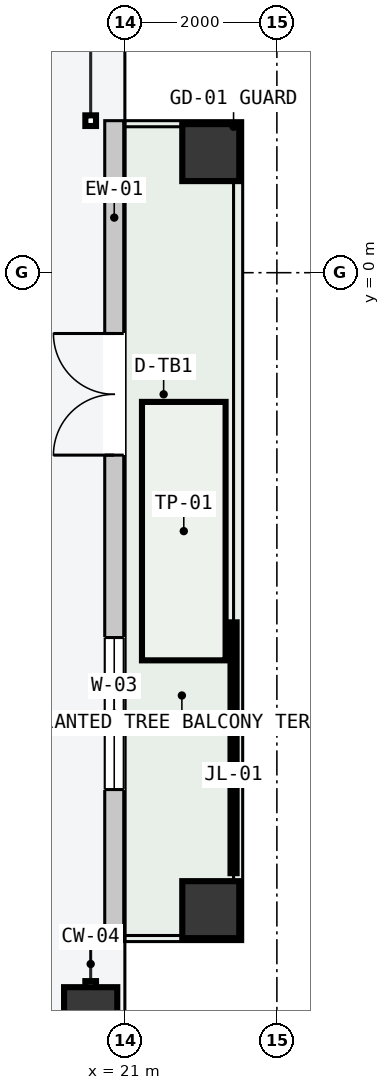
"""IFC4 building model, lengths in metres.
Left out: names, types, materials, properties, quantities, classifications, styles, units other than length and angle.
Written with IfcOpenShell. Run it as: python <this file> out.ifc"""

import sys

from ifc_helpers import new_model, si_unit, direction, frame, frame_2d, origin, origin_2d, place, context, subcontext, project, spatial, rectangle, hollow_rectangle, extrude, element, fill, save


model = new_model("IFC4")
c1 = context("Model", 3, precision=1e-05, world=origin(), true_north=direction((0.0, 1.0)))
c2 = subcontext(c1, "Body", "Model", "MODEL_VIEW")
j1 = project(units=[si_unit("LENGTHUNIT", "METRE"), si_unit("PLANEANGLEUNIT", "RADIAN")], contexts=[c1])
p1 = place(None, origin())
s1 = spatial("IfcSite", under=j1, at=p1, CompositionType="ELEMENT")
p2 = place(p1, origin())
s2 = spatial("IfcBuilding", under=s1, at=p2, CompositionType="ELEMENT")
p3 = place(p2, frame((0.0, 0.0, 201.9)))
s3 = spatial("IfcBuildingStorey", under=s2, at=p3, CompositionType="ELEMENT", Elevation=201.9)
p4 = place(p3, frame((20.55, -9.75, 0.0), z_axis=(0.0, 0.0, 1.0), x_axis=(0.0, 1.0, 0.0)))
e1 = element("IfcColumn", 1, at=p4, inside=s3, PredefinedType="COLUMN", context=c2, shape_type="SweptSolid", body=[
    extrude(hollow_rectangle(XDim=0.7, YDim=0.7, WallThickness=0.03, at=origin_2d()), origin(), (0.0, 0.0, 1.0), 3.6),
])
for number, where, z_axis, x_axis in (
    (2, (22.13, -8.38, 0.0), (0.0, 0.0, 1.0), (0.0, 1.0, 0.0)),
    (3, (22.13, 1.58, 0.0), (0.0, 0.0, 1.0), (0.0, 1.0, 0.0)),
):
    element("IfcColumn", number, at=place(p3, frame(where, z_axis=z_axis, x_axis=x_axis)), inside=s3, PredefinedType="COLUMN", context=c2, shape_type="SweptSolid", body=[
        extrude(hollow_rectangle(XDim=0.75, YDim=0.75, WallThickness=0.032, at=origin_2d()), origin(), (0.0, 0.0, 1.0), 3.6),
    ])
p5 = place(p3, frame((20.86, -8.8, 0.0), z_axis=(0.0, 0.0, 1.0), x_axis=(0.0, 1.0, 0.0)))
e4 = element("IfcWall", 4, at=p5, inside=s3, PredefinedType="STANDARD", context=c2, shape_type="SweptSolid", body=[
    extrude(rectangle(XDim=10.8, YDim=0.25, at=frame_2d((5.4, 0.0))), origin(), (0.0, 0.0, 1.0), 3.4),
])
p6 = place(p5, frame((6.4, 0.0, 0.0)))
e5 = element("IfcOpeningElement", 5, at=p6, cuts=e4, PredefinedType="OPENING", context=c2, shape_type="SweptSolid", body=[
    extrude(rectangle(XDim=1.6, YDim=2.2, at=frame_2d((0.8, 1.1))), frame((0.0, 0.135, 0.0), z_axis=(0.0, -1.0, 0.0), x_axis=(1.0, 0.0, 0.0)), (0.0, 0.0, 1.0), 0.27),
])
p7 = place(p5, frame((2.0, 0.0, 0.85)))
e6 = element("IfcOpeningElement", 6, at=p7, cuts=e4, PredefinedType="OPENING", context=c2, shape_type="SweptSolid", body=[
    extrude(rectangle(XDim=2.0, YDim=2.1, at=frame_2d((1.0, 1.05))), frame((0.0, 0.135, 0.0), z_axis=(0.0, -1.0, 0.0), x_axis=(1.0, 0.0, 0.0)), (0.0, 0.0, 1.0), 0.27),
])
p8 = place(p6, origin())
e7 = element("IfcDoor", 7, at=p8, inside=s3, OperationType="DOUBLE_DOOR_SINGLE_SWING", PredefinedType="DOOR", context=c2, shape_type="SweptSolid", body=[
    extrude(rectangle(XDim=1.6, YDim=2.2, at=frame_2d((0.8, 1.1))), frame((0.0, 0.025, 0.0), z_axis=(0.0, -1.0, 0.0), x_axis=(1.0, 0.0, 0.0)), (0.0, 0.0, 1.0), 0.05),
])
fill(e5, e7)
p9 = place(p7, origin())
e8 = element("IfcWindow", 8, at=p9, inside=s3, PartitioningType="SINGLE_PANEL", PredefinedType="WINDOW", context=c2, shape_type="SweptSolid", body=[
    extrude(rectangle(XDim=2.0, YDim=2.1, at=frame_2d((1.0, 1.05))), frame((0.0, 0.03, 0.0), z_axis=(0.0, -1.0, 0.0), x_axis=(1.0, 0.0, 0.0)), (0.0, 0.0, 1.0), 0.06),
])
fill(e6, e8)
save(model, sys.argv[1])
